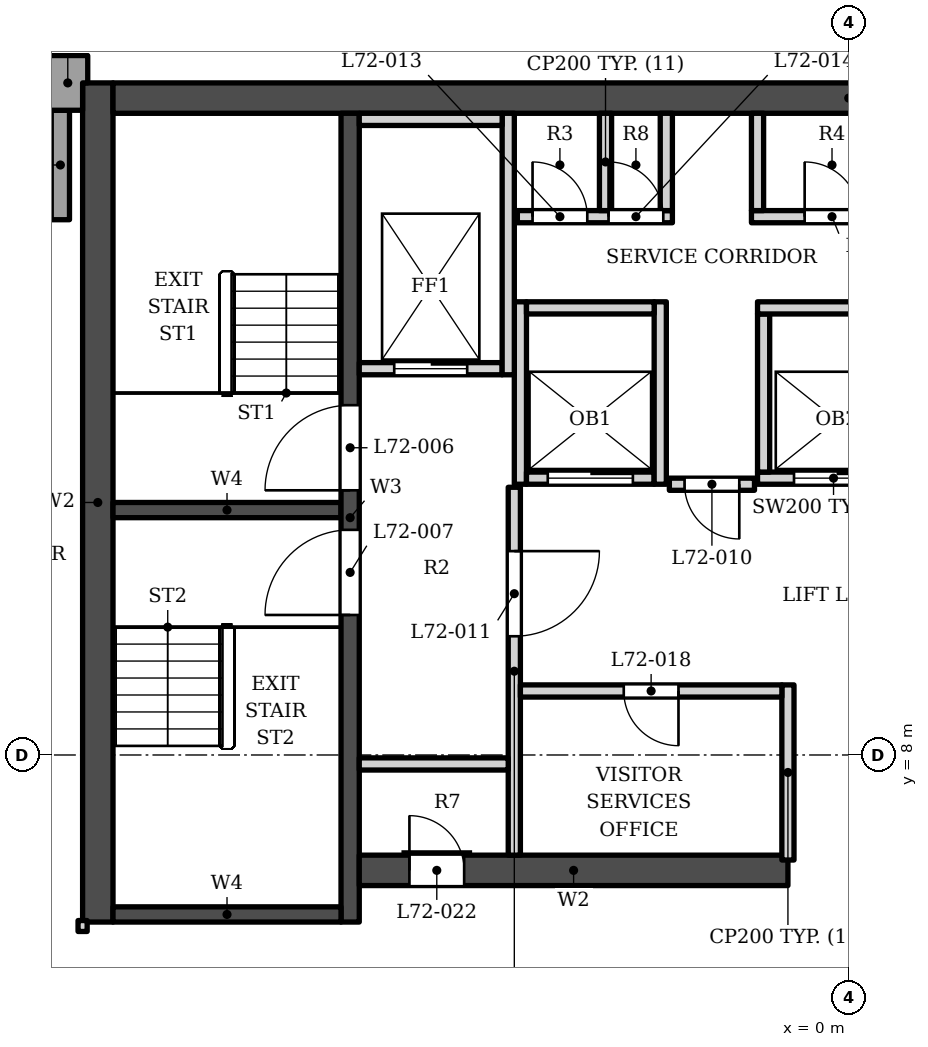
"""IFC4 building model, lengths in metres.
Left out: names, types, materials, properties, quantities, classifications, styles, units other than length and angle.
Written with IfcOpenShell. Run it as: python <this file> out.ifc"""

import sys

from ifc_helpers import new_model, si_unit, direction, frame, frame_2d, origin, place, context, subcontext, project, spatial, polyline, rectangle, outline, extrude, element, fill, save


model = new_model("IFC4")
c1 = context("Model", 3, precision=1e-05, world=origin(), true_north=direction((0.0, 1.0)))
c2 = subcontext(c1, "Body", "Model", "MODEL_VIEW")
j1 = project(units=[si_unit("LENGTHUNIT", "METRE"), si_unit("PLANEANGLEUNIT", "RADIAN")], contexts=[c1])
p1 = place(None, origin())
s1 = spatial("IfcSite", under=j1, at=p1, CompositionType="ELEMENT")
p2 = place(p1, origin())
s2 = spatial("IfcBuilding", under=s1, at=p2, CompositionType="ELEMENT")
p3 = place(p2, frame((0.0, 0.0, 302.5)))
s3 = spatial("IfcBuildingStorey", under=s2, at=p3, CompositionType="ELEMENT", Elevation=302.5)
p4 = place(p3, frame((-12.1, 18.802, 0.0), z_axis=(0.0, 0.0, 1.0), x_axis=(1.0, 0.0, 0.0)))
e1 = element("IfcWall", 1, at=p4, inside=s3, PredefinedType="SHEAR", context=c2, shape_type="SweptSolid", body=[
    extrude(rectangle(XDim=24.2, YDim=0.5, at=frame_2d((12.1, 0.0))), origin(), (0.0, 0.0, 1.0), 8.0),
])
p5 = place(p3, frame((-12.35, 5.253, 0.0), z_axis=(0.0, 0.0, 1.0), x_axis=(0.0, 1.0, 0.0)))
e2 = element("IfcWall", 2, at=p5, inside=s3, PredefinedType="SHEAR", context=c2, shape_type="SweptSolid", body=[
    extrude(rectangle(XDim=13.8, YDim=0.5, at=frame_2d((6.9, 0.0))), origin(), (0.0, 0.0, 1.0), 8.0),
])
p6 = place(p3, frame((-8.2, 5.253, 0.0), z_axis=(0.0, 0.0, 1.0), x_axis=(0.0, 1.0, 0.0)))
e3 = element("IfcWall", 3, at=p6, inside=s3, PredefinedType="SHEAR", context=c2, shape_type="SweptSolid", body=[
    extrude(rectangle(XDim=13.3, YDim=0.3, at=frame_2d((6.65, 0.0))), origin(), (0.0, 0.0, 1.0), 8.0),
])
p7 = place(p6, frame((7.1, 0.0, 0.0)))
e4 = element("IfcOpeningElement", 4, at=p7, cuts=e3, PredefinedType="OPENING", context=c2, shape_type="SweptSolid", body=[
    extrude(rectangle(XDim=1.4, YDim=2.1, at=frame_2d((0.7, 1.05))), frame((0.0, 0.16, 0.0), z_axis=(0.0, -1.0, 0.0), x_axis=(1.0, 0.0, 0.0)), (0.0, 0.0, 1.0), 0.32),
])
p8 = place(p6, frame((5.05, 0.0, 0.0)))
e5 = element("IfcOpeningElement", 5, at=p8, cuts=e3, PredefinedType="OPENING", context=c2, shape_type="SweptSolid", body=[
    extrude(rectangle(XDim=1.4, YDim=2.1, at=frame_2d((0.7, 1.05))), frame((0.0, 0.16, 0.0), z_axis=(0.0, -1.0, 0.0), x_axis=(1.0, 0.0, 0.0)), (0.0, 0.0, 1.0), 0.32),
])
for number, where, z_axis, x_axis in (
    (6, (-12.1, 12.028, 0.0), (0.0, 0.0, 1.0), (1.0, 0.0, 0.0)),
    (7, (-12.1, 5.378, 0.0), (0.0, 0.0, 1.0), (1.0, 0.0, 0.0)),
):
    element("IfcWall", number, at=place(p3, frame(where, z_axis=z_axis, x_axis=x_axis)), inside=s3, PredefinedType="SHEAR", context=c2, shape_type="SweptSolid", body=[
        extrude(rectangle(XDim=3.75, YDim=0.25, at=frame_2d((1.875, 0.0))), origin(), (0.0, 0.0, 1.0), 8.0),
    ])
p9 = place(p3, frame((-8.05, 6.103, 0.0), z_axis=(0.0, 0.0, 1.0), x_axis=(1.0, 0.0, 0.0)))
e8 = element("IfcWall", 8, at=p9, inside=s3, PredefinedType="SHEAR", context=c2, shape_type="SweptSolid", body=[
    extrude(rectangle(XDim=7.05, YDim=0.5, at=frame_2d((3.525, 0.0))), origin(), (0.0, 0.0, 1.0), 8.0),
])
p10 = place(p9, frame((0.825, 0.0, 0.0)))
e9 = element("IfcOpeningElement", 9, at=p10, cuts=e8, PredefinedType="OPENING", context=c2, shape_type="SweptSolid", body=[
    extrude(rectangle(XDim=0.9, YDim=2.1, at=frame_2d((0.45, 1.05))), frame((0.0, 0.26, 0.0), z_axis=(0.0, -1.0, 0.0), x_axis=(1.0, 0.0, 0.0)), (0.0, 0.0, 1.0), 0.52),
])
p11 = place(p3, origin())
e10 = element("IfcWall", 10, at=p11, inside=s3, PredefinedType="SOLIDWALL", context=c2, shape_type="SweptSolid", body=[
    extrude(outline(polyline([(-12.516, 19.052), (-12.516, 19.502), (-13.416, 19.502), (-13.416, 18.603), (-12.6, 18.603), (-12.6, 19.052), (-12.516, 19.052)])), origin(), (0.0, 0.0, 1.0), 7.0),
])
p12 = place(p3, origin())
e11 = element("IfcWall", 11, at=p12, inside=s3, PredefinedType="SOLIDWALL", context=c2, shape_type="SweptSolid", body=[
    extrude(outline(polyline([(-12.816, 16.802), (-12.816, 18.603), (-13.116, 18.603), (-13.116, 16.802), (-12.816, 16.802)])), origin(), (0.0, 0.0, 1.0), 7.0),
])
p13 = place(p3, frame((-1.0, 6.273, 0.0), z_axis=(0.0, 0.0, 1.0), x_axis=(0.0, 1.0, 0.0)))
e12 = element("IfcWall", 12, at=p13, inside=s3, PredefinedType="PARTITIONING", context=c2, shape_type="SweptSolid", body=[
    extrude(rectangle(XDim=2.88, YDim=0.2, at=frame_2d((1.44, 0.0))), origin(), (0.0, 0.0, 1.0), 7.8),
])
p14 = place(p3, frame((-5.5, 6.353, 0.0), z_axis=(0.0, 0.0, 1.0), x_axis=(0.0, 1.0, 0.0)))
e13 = element("IfcWall", 13, at=p14, inside=s3, PredefinedType="SOLIDWALL", context=c2, shape_type="SweptSolid", body=[
    extrude(rectangle(XDim=6.05, YDim=0.2, at=frame_2d((3.025, 0.0))), origin(), (0.0, 0.0, 1.0), 7.8),
])
p15 = place(p14, frame((3.6, 0.0, 0.0)))
e14 = element("IfcOpeningElement", 14, at=p15, cuts=e13, PredefinedType="OPENING", context=c2, shape_type="SweptSolid", body=[
    extrude(rectangle(XDim=1.4, YDim=2.1, at=frame_2d((0.7, 1.05))), frame((0.0, 0.11, 0.0), z_axis=(0.0, -1.0, 0.0), x_axis=(1.0, 0.0, 0.0)), (0.0, 0.0, 1.0), 0.22),
])
p16 = place(p3, frame((-8.05, 7.853, 0.0), z_axis=(0.0, 0.0, 1.0), x_axis=(1.0, 0.0, 0.0)))
e15 = element("IfcWall", 15, at=p16, inside=s3, PredefinedType="SOLIDWALL", context=c2, shape_type="SweptSolid", body=[
    extrude(rectangle(XDim=2.45, YDim=0.2, at=frame_2d((1.225, 0.0))), origin(), (0.0, 0.0, 1.0), 7.8),
])
p17 = place(p3, frame((-5.4, 9.052, 0.0), z_axis=(0.0, 0.0, 1.0), x_axis=(1.0, 0.0, 0.0)))
e16 = element("IfcWall", 16, at=p17, inside=s3, PredefinedType="PARTITIONING", context=c2, shape_type="SweptSolid", body=[
    extrude(rectangle(XDim=4.3, YDim=0.2, at=frame_2d((2.15, 0.0))), origin(), (0.0, 0.0, 1.0), 7.8),
])
p18 = place(p17, frame((1.7, 0.0, 0.0)))
e17 = element("IfcOpeningElement", 17, at=p18, cuts=e16, PredefinedType="OPENING", context=c2, shape_type="SweptSolid", body=[
    extrude(rectangle(XDim=0.9, YDim=2.1, at=frame_2d((0.45, 1.05))), frame((0.0, 0.11, 0.0), z_axis=(0.0, -1.0, 0.0), x_axis=(1.0, 0.0, 0.0)), (0.0, 0.0, 1.0), 0.22),
])
p19 = place(p3, frame((-2.95, 12.453, 0.0), z_axis=(0.0, 0.0, 1.0), x_axis=(1.0, 0.0, 0.0)))
e18 = element("IfcWall", 18, at=p19, inside=s3, PredefinedType="SOLIDWALL", context=c2, shape_type="SweptSolid", body=[
    extrude(rectangle(XDim=1.4, YDim=0.2, at=frame_2d((0.7, 0.0))), origin(), (0.0, 0.0, 1.0), 7.8),
])
p20 = place(p19, frame((0.25, 0.0, 0.0)))
e19 = element("IfcOpeningElement", 19, at=p20, cuts=e18, PredefinedType="OPENING", context=c2, shape_type="SweptSolid", body=[
    extrude(rectangle(XDim=0.9, YDim=2.1, at=frame_2d((0.45, 1.05))), frame((0.0, 0.11, 0.0), z_axis=(0.0, -1.0, 0.0), x_axis=(1.0, 0.0, 0.0)), (0.0, 0.0, 1.0), 0.22),
])
p21 = place(p3, frame((-5.4, 12.453, 0.0), z_axis=(0.0, 0.0, 1.0), x_axis=(0.0, 1.0, 0.0)))
e20 = element("IfcWall", 20, at=p21, inside=s3, PredefinedType="SOLIDWALL", context=c2, shape_type="SweptSolid", body=[
    extrude(rectangle(XDim=3.0, YDim=0.2, at=frame_2d((1.5, 0.0))), origin(), (0.0, 0.0, 1.0), 7.8),
])
p22 = place(p3, frame((-5.3, 12.552, 0.0), z_axis=(0.0, 0.0, 1.0), x_axis=(1.0, 0.0, 0.0)))
e21 = element("IfcWall", 21, at=p22, inside=s3, PredefinedType="SOLIDWALL", context=c2, shape_type="SweptSolid", body=[
    extrude(rectangle(XDim=2.1, YDim=0.2, at=frame_2d((1.05, 0.0))), origin(), (0.0, 0.0, 1.0), 7.8),
])
p23 = place(p22, frame((0.35, 0.0, 0.0)))
e22 = element("IfcOpeningElement", 22, at=p23, cuts=e21, PredefinedType="OPENING", context=c2, shape_type="SweptSolid", body=[
    extrude(rectangle(XDim=1.4, YDim=2.4, at=frame_2d((0.7, 1.2))), frame((0.0, 0.11, 0.0), z_axis=(0.0, -1.0, 0.0), x_axis=(1.0, 0.0, 0.0)), (0.0, 0.0, 1.0), 0.22),
])
p24 = place(p3, frame((-3.1, 12.453, 0.0), z_axis=(0.0, 0.0, 1.0), x_axis=(0.0, 1.0, 0.0)))
e23 = element("IfcWall", 23, at=p24, inside=s3, PredefinedType="SOLIDWALL", context=c2, shape_type="SweptSolid", body=[
    extrude(rectangle(XDim=3.0, YDim=0.2, at=frame_2d((1.5, 0.0))), origin(), (0.0, 0.0, 1.0), 7.8),
])
p25 = place(p3, frame((-1.5, 12.552, 0.0), z_axis=(0.0, 0.0, 1.0), x_axis=(1.0, 0.0, 0.0)))
e24 = element("IfcWall", 24, at=p25, inside=s3, PredefinedType="SOLIDWALL", context=c2, shape_type="SweptSolid", body=[
    extrude(rectangle(XDim=2.5, YDim=0.2, at=frame_2d((1.25, 0.0))), origin(), (0.0, 0.0, 1.0), 7.8),
])
p26 = place(p25, frame((0.6, 0.0, 0.0)))
e25 = element("IfcOpeningElement", 25, at=p26, cuts=e24, PredefinedType="OPENING", context=c2, shape_type="SweptSolid", body=[
    extrude(rectangle(XDim=1.4, YDim=2.4, at=frame_2d((0.7, 1.2))), frame((0.0, 0.11, 0.0), z_axis=(0.0, -1.0, 0.0), x_axis=(1.0, 0.0, 0.0)), (0.0, 0.0, 1.0), 0.22),
])
p27 = place(p3, frame((-1.4, 12.653, 0.0), z_axis=(0.0, 0.0, 1.0), x_axis=(0.0, 1.0, 0.0)))
e26 = element("IfcWall", 26, at=p27, inside=s3, PredefinedType="SOLIDWALL", context=c2, shape_type="SweptSolid", body=[
    extrude(rectangle(XDim=2.6, YDim=0.2, at=frame_2d((1.3, 0.0))), origin(), (0.0, 0.0, 1.0), 7.8),
])
p28 = place(p3, frame((-8.05, 14.353, 0.0), z_axis=(0.0, 0.0, 1.0), x_axis=(1.0, 0.0, 0.0)))
e27 = element("IfcWall", 27, at=p28, inside=s3, PredefinedType="SOLIDWALL", context=c2, shape_type="SweptSolid", body=[
    extrude(rectangle(XDim=2.35, YDim=0.2, at=frame_2d((1.175, 0.0))), origin(), (0.0, 0.0, 1.0), 7.8),
])
p29 = place(p28, frame((0.575, 0.0, 0.0)))
e28 = element("IfcOpeningElement", 28, at=p29, cuts=e27, PredefinedType="OPENING", context=c2, shape_type="SweptSolid", body=[
    extrude(rectangle(XDim=1.2, YDim=2.1, at=frame_2d((0.6, 1.05))), frame((0.0, 0.11, 0.0), z_axis=(0.0, -1.0, 0.0), x_axis=(1.0, 0.0, 0.0)), (0.0, 0.0, 1.0), 0.22),
])
p30 = place(p3, frame((-5.6, 14.253, 0.0), z_axis=(0.0, 0.0, 1.0), x_axis=(0.0, 1.0, 0.0)))
e29 = element("IfcWall", 29, at=p30, inside=s3, PredefinedType="SOLIDWALL", context=c2, shape_type="SweptSolid", body=[
    extrude(rectangle(XDim=4.3, YDim=0.2, at=frame_2d((2.15, 0.0))), origin(), (0.0, 0.0, 1.0), 7.8),
])
p31 = place(p3, frame((-5.3, 15.353, 0.0), z_axis=(0.0, 0.0, 1.0), x_axis=(1.0, 0.0, 0.0)))
e30 = element("IfcWall", 30, at=p31, inside=s3, PredefinedType="SOLIDWALL", context=c2, shape_type="SweptSolid", body=[
    extrude(rectangle(XDim=2.1, YDim=0.2, at=frame_2d((1.05, 0.0))), origin(), (0.0, 0.0, 1.0), 7.8),
])
p32 = place(p3, frame((-1.5, 15.353, 0.0), z_axis=(0.0, 0.0, 1.0), x_axis=(1.0, 0.0, 0.0)))
e31 = element("IfcWall", 31, at=p32, inside=s3, PredefinedType="SOLIDWALL", context=c2, shape_type="SweptSolid", body=[
    extrude(rectangle(XDim=2.5, YDim=0.2, at=frame_2d((1.25, 0.0))), origin(), (0.0, 0.0, 1.0), 7.8),
])
p33 = place(p3, frame((-5.45, 16.853, 0.0), z_axis=(0.0, 0.0, 1.0), x_axis=(1.0, 0.0, 0.0)))
e32 = element("IfcWall", 32, at=p33, inside=s3, PredefinedType="SOLIDWALL", context=c2, shape_type="SweptSolid", body=[
    extrude(rectangle(XDim=2.55, YDim=0.2, at=frame_2d((1.275, 0.0))), origin(), (0.0, 0.0, 1.0), 7.8),
])
p34 = place(p33, frame((0.25, 0.0, 0.0)))
e33 = element("IfcOpeningElement", 33, at=p34, cuts=e32, PredefinedType="OPENING", context=c2, shape_type="SweptSolid", body=[
    extrude(rectangle(XDim=0.9, YDim=2.1, at=frame_2d((0.45, 1.05))), frame((0.0, 0.11, 0.0), z_axis=(0.0, -1.0, 0.0), x_axis=(1.0, 0.0, 0.0)), (0.0, 0.0, 1.0), 0.22),
])
p35 = place(p33, frame((1.5, 0.0, 0.0)))
e34 = element("IfcOpeningElement", 34, at=p35, cuts=e32, PredefinedType="OPENING", context=c2, shape_type="SweptSolid", body=[
    extrude(rectangle(XDim=0.9, YDim=2.1, at=frame_2d((0.45, 1.05))), frame((0.0, 0.11, 0.0), z_axis=(0.0, -1.0, 0.0), x_axis=(1.0, 0.0, 0.0)), (0.0, 0.0, 1.0), 0.22),
])
p36 = place(p3, frame((-1.6, 16.853, 0.0), z_axis=(0.0, 0.0, 1.0), x_axis=(1.0, 0.0, 0.0)))
e35 = element("IfcWall", 35, at=p36, inside=s3, PredefinedType="SOLIDWALL", context=c2, shape_type="SweptSolid", body=[
    extrude(rectangle(XDim=7.05, YDim=0.2, at=frame_2d((3.525, 0.0))), origin(), (0.0, 0.0, 1.0), 7.8),
])
p37 = place(p36, frame((0.875, 0.0, 0.0)))
e36 = element("IfcOpeningElement", 36, at=p37, cuts=e35, PredefinedType="OPENING", context=c2, shape_type="SweptSolid", body=[
    extrude(rectangle(XDim=0.9, YDim=2.1, at=frame_2d((0.45, 1.05))), frame((0.0, 0.11, 0.0), z_axis=(0.0, -1.0, 0.0), x_axis=(1.0, 0.0, 0.0)), (0.0, 0.0, 1.0), 0.22),
])
p38 = place(p36, frame((3.325, 0.0, 0.0)))
e37 = element("IfcOpeningElement", 37, at=p38, cuts=e35, PredefinedType="OPENING", context=c2, shape_type="SweptSolid", body=[
    extrude(rectangle(XDim=0.9, YDim=2.1, at=frame_2d((0.45, 1.05))), frame((0.0, 0.11, 0.0), z_axis=(0.0, -1.0, 0.0), x_axis=(1.0, 0.0, 0.0)), (0.0, 0.0, 1.0), 0.22),
])
p39 = place(p36, frame((5.6, 0.0, 0.0)))
e38 = element("IfcOpeningElement", 38, at=p39, cuts=e35, PredefinedType="OPENING", context=c2, shape_type="SweptSolid", body=[
    extrude(rectangle(XDim=0.9, YDim=2.1, at=frame_2d((0.45, 1.05))), frame((0.0, 0.11, 0.0), z_axis=(0.0, -1.0, 0.0), x_axis=(1.0, 0.0, 0.0)), (0.0, 0.0, 1.0), 0.22),
])
for number, where, z_axis, x_axis in (
    (39, (-4.0, 16.953, 0.0), (0.0, 0.0, 1.0), (0.0, 1.0, 0.0)),
    (40, (-3.0, 16.953, 0.0), (0.0, 0.0, 1.0), (0.0, 1.0, 0.0)),
    (41, (-1.5, 16.953, 0.0), (0.0, 0.0, 1.0), (0.0, 1.0, 0.0)),
):
    element("IfcWall", number, at=place(p3, frame(where, z_axis=z_axis, x_axis=x_axis)), inside=s3, PredefinedType="PARTITIONING", context=c2, shape_type="SweptSolid", body=[
        extrude(rectangle(XDim=1.6, YDim=0.2, at=frame_2d((0.8, 0.0))), origin(), (0.0, 0.0, 1.0), 7.8),
    ])
p40 = place(p3, frame((-8.05, 18.453, 0.0), z_axis=(0.0, 0.0, 1.0), x_axis=(1.0, 0.0, 0.0)))
e42 = element("IfcWall", 42, at=p40, inside=s3, PredefinedType="SOLIDWALL", context=c2, shape_type="SweptSolid", body=[
    extrude(rectangle(XDim=2.35, YDim=0.2, at=frame_2d((1.175, 0.0))), origin(), (0.0, 0.0, 1.0), 7.8),
])
p41 = place(p3, frame((-12.6, 5.098, 0.0), z_axis=(0.0, 0.0, 1.0), x_axis=(0.0, 1.0, 0.0)))
e43 = element("IfcWall", 43, at=p41, inside=s3, PredefinedType="PARTITIONING", context=c2, shape_type="SweptSolid", body=[
    extrude(rectangle(XDim=0.18, YDim=0.15, at=frame_2d((0.09, 0.0))), origin(), (0.0, 0.0, 1.0), 7.8),
])
p42 = place(p23, origin())
e44 = element("IfcDoor", 44, at=p42, inside=s3, OperationType="DOUBLE_DOOR_SLIDING", PredefinedType="DOOR", context=c2, shape_type="SweptSolid", body=[
    extrude(rectangle(XDim=1.4, YDim=2.4, at=frame_2d((0.7, 1.2))), frame((0.0, 0.025, 0.0), z_axis=(0.0, -1.0, 0.0), x_axis=(1.0, 0.0, 0.0)), (0.0, 0.0, 1.0), 0.05),
])
fill(e22, e44)
p43 = place(p26, origin())
e45 = element("IfcDoor", 45, at=p43, inside=s3, OperationType="DOUBLE_DOOR_SLIDING", PredefinedType="DOOR", context=c2, shape_type="SweptSolid", body=[
    extrude(rectangle(XDim=1.4, YDim=2.4, at=frame_2d((0.7, 1.2))), frame((0.0, 0.025, 0.0), z_axis=(0.0, -1.0, 0.0), x_axis=(1.0, 0.0, 0.0)), (0.0, 0.0, 1.0), 0.05),
])
fill(e25, e45)
p44 = place(p29, origin())
e46 = element("IfcDoor", 46, at=p44, inside=s3, OperationType="DOUBLE_DOOR_SLIDING", PredefinedType="DOOR", context=c2, shape_type="SweptSolid", body=[
    extrude(rectangle(XDim=1.2, YDim=2.1, at=frame_2d((0.6, 1.05))), frame((0.0, 0.025, 0.0), z_axis=(0.0, -1.0, 0.0), x_axis=(1.0, 0.0, 0.0)), (0.0, 0.0, 1.0), 0.05),
])
fill(e28, e46)
p45 = place(p7, origin())
e47 = element("IfcDoor", 47, at=p45, inside=s3, OperationType="SINGLE_SWING_LEFT", PredefinedType="DOOR", context=c2, shape_type="SweptSolid", body=[
    extrude(rectangle(XDim=1.4, YDim=2.1, at=frame_2d((0.7, 1.05))), frame((0.0, 0.025, 0.0), z_axis=(0.0, -1.0, 0.0), x_axis=(1.0, 0.0, 0.0)), (0.0, 0.0, 1.0), 0.05),
])
fill(e4, e47)
p46 = place(p8, origin())
e48 = element("IfcDoor", 48, at=p46, inside=s3, OperationType="SINGLE_SWING_LEFT", PredefinedType="DOOR", context=c2, shape_type="SweptSolid", body=[
    extrude(rectangle(XDim=1.4, YDim=2.1, at=frame_2d((0.7, 1.05))), frame((0.0, 0.025, 0.0), z_axis=(0.0, -1.0, 0.0), x_axis=(1.0, 0.0, 0.0)), (0.0, 0.0, 1.0), 0.05),
])
fill(e5, e48)
p47 = place(p20, origin())
e49 = element("IfcDoor", 49, at=p47, inside=s3, OperationType="SINGLE_SWING_RIGHT", PredefinedType="DOOR", context=c2, shape_type="SweptSolid", body=[
    extrude(rectangle(XDim=0.9, YDim=2.1, at=frame_2d((0.45, 1.05))), frame((0.0, 0.025, 0.0), z_axis=(0.0, -1.0, 0.0), x_axis=(1.0, 0.0, 0.0)), (0.0, 0.0, 1.0), 0.05),
])
fill(e19, e49)
p48 = place(p15, origin())
e50 = element("IfcDoor", 50, at=p48, inside=s3, OperationType="SINGLE_SWING_RIGHT", PredefinedType="DOOR", context=c2, shape_type="SweptSolid", body=[
    extrude(rectangle(XDim=1.4, YDim=2.1, at=frame_2d((0.7, 1.05))), frame((0.0, 0.025, 0.0), z_axis=(0.0, -1.0, 0.0), x_axis=(1.0, 0.0, 0.0)), (0.0, 0.0, 1.0), 0.05),
])
fill(e14, e50)
p49 = place(p34, origin())
e51 = element("IfcDoor", 51, at=p49, inside=s3, OperationType="SINGLE_SWING_LEFT", PredefinedType="DOOR", context=c2, shape_type="SweptSolid", body=[
    extrude(rectangle(XDim=0.9, YDim=2.1, at=frame_2d((0.45, 1.05))), frame((0.0, 0.025, 0.0), z_axis=(0.0, -1.0, 0.0), x_axis=(1.0, 0.0, 0.0)), (0.0, 0.0, 1.0), 0.05),
])
fill(e33, e51)
p50 = place(p35, origin())
e52 = element("IfcDoor", 52, at=p50, inside=s3, OperationType="SINGLE_SWING_LEFT", PredefinedType="DOOR", context=c2, shape_type="SweptSolid", body=[
    extrude(rectangle(XDim=0.9, YDim=2.1, at=frame_2d((0.45, 1.05))), frame((0.0, 0.025, 0.0), z_axis=(0.0, -1.0, 0.0), x_axis=(1.0, 0.0, 0.0)), (0.0, 0.0, 1.0), 0.05),
])
fill(e34, e52)
p51 = place(p37, origin())
e53 = element("IfcDoor", 53, at=p51, inside=s3, OperationType="SINGLE_SWING_LEFT", PredefinedType="DOOR", context=c2, shape_type="SweptSolid", body=[
    extrude(rectangle(XDim=0.9, YDim=2.1, at=frame_2d((0.45, 1.05))), frame((0.0, 0.025, 0.0), z_axis=(0.0, -1.0, 0.0), x_axis=(1.0, 0.0, 0.0)), (0.0, 0.0, 1.0), 0.05),
])
fill(e36, e53)
p52 = place(p18, origin())
e54 = element("IfcDoor", 54, at=p52, inside=s3, OperationType="SINGLE_SWING_RIGHT", PredefinedType="DOOR", context=c2, shape_type="SweptSolid", body=[
    extrude(rectangle(XDim=0.9, YDim=2.1, at=frame_2d((0.45, 1.05))), frame((0.0, 0.025, 0.0), z_axis=(0.0, -1.0, 0.0), x_axis=(1.0, 0.0, 0.0)), (0.0, 0.0, 1.0), 0.05),
])
fill(e17, e54)
p53 = place(p10, origin())
e55 = element("IfcDoor", 55, at=p53, inside=s3, OperationType="SINGLE_SWING_LEFT", PredefinedType="DOOR", context=c2, shape_type="SweptSolid", body=[
    extrude(rectangle(XDim=0.9, YDim=2.1, at=frame_2d((0.45, 1.05))), frame((0.0, 0.025, 0.0), z_axis=(0.0, -1.0, 0.0), x_axis=(1.0, 0.0, 0.0)), (0.0, 0.0, 1.0), 0.05),
])
fill(e9, e55)
save(model, sys.argv[1])
